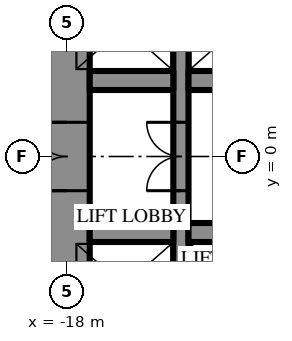
"""IFC4 building model, lengths in metres.
Left out: names, types, materials, properties, quantities, classifications, styles, units other than length and angle.
Written with IfcOpenShell. Run it as: python <this file> out.ifc"""

import sys

from ifc_helpers import new_model, si_unit, direction, frame, frame_2d, origin, place, context, subcontext, project, spatial, rectangle, extrude, element, fill, save


model = new_model("IFC4")
c1 = context("Model", 3, precision=1e-05, world=origin(), true_north=direction((0.0, 1.0)))
c2 = subcontext(c1, "Body", "Model", "MODEL_VIEW")
j1 = project(units=[si_unit("LENGTHUNIT", "METRE"), si_unit("PLANEANGLEUNIT", "RADIAN")], contexts=[c1])
p1 = place(None, origin())
s1 = spatial("IfcSite", under=j1, at=p1, CompositionType="ELEMENT")
p2 = place(p1, origin())
s2 = spatial("IfcBuilding", under=s1, at=p2, CompositionType="ELEMENT")
p3 = place(p2, frame((0.0, 0.0, 65.5)))
s3 = spatial("IfcBuildingStorey", under=s2, at=p3, CompositionType="ELEMENT", Elevation=65.5)
p4 = place(p3, frame((-18.0, 10.7, 0.0), z_axis=(0.0, 0.0, 1.0), x_axis=(0.0, -1.0, 0.0)))
e1 = element("IfcWall", 1, at=p4, inside=s3, PredefinedType="SHEAR", context=c2, shape_type="SweptSolid", body=[
    extrude(rectangle(XDim=21.4, YDim=1.2, at=frame_2d((10.7, 0.0))), origin(), (0.0, 0.0, 1.0), 4.2),
])
p5 = place(p4, frame((9.8, 0.0, 0.0)))
e2 = element("IfcOpeningElement", 2, at=p5, cuts=e1, PredefinedType="OPENING", context=c2, shape_type="SweptSolid", body=[
    extrude(rectangle(XDim=1.8, YDim=2.4, at=frame_2d((0.9, 1.2))), frame((0.0, 0.61, 0.0), z_axis=(0.0, -1.0, 0.0), x_axis=(1.0, 0.0, 0.0)), (0.0, 0.0, 1.0), 1.22),
])
p6 = place(p3, frame((-15.0, -10.7, 0.0), z_axis=(0.0, 0.0, 1.0), x_axis=(0.0, 1.0, 0.0)))
e3 = element("IfcWall", 3, at=p6, inside=s3, PredefinedType="SHEAR", context=c2, shape_type="SweptSolid", body=[
    extrude(rectangle(XDim=21.4, YDim=0.4, at=frame_2d((10.7, 0.0))), origin(), (0.0, 0.0, 1.0), 4.2),
])
p7 = place(p6, frame((9.8, 0.0, 0.0)))
e4 = element("IfcOpeningElement", 4, at=p7, cuts=e3, PredefinedType="OPENING", context=c2, shape_type="SweptSolid", body=[
    extrude(rectangle(XDim=1.8, YDim=2.4, at=frame_2d((0.9, 1.2))), frame((0.0, 0.21, 0.0), z_axis=(0.0, -1.0, 0.0), x_axis=(1.0, 0.0, 0.0)), (0.0, 0.0, 1.0), 0.42),
])
p8 = place(p3, frame((-17.4, 2.0, 0.0), z_axis=(0.0, 0.0, 1.0), x_axis=(1.0, 0.0, 0.0)))
e5 = element("IfcWall", 5, at=p8, inside=s3, PredefinedType="SHEAR", context=c2, shape_type="SweptSolid", body=[
    extrude(rectangle(XDim=2.2, YDim=0.5, at=frame_2d((1.1, 0.0))), origin(), (0.0, 0.0, 1.0), 4.2),
])
for number, where, z_axis, x_axis in (
    (6, (-14.8, 2.0, 0.0), (0.0, 0.0, 1.0), (1.0, 0.0, 0.0)),
    (7, (-12.3, -2.0, 0.0), (0.0, 0.0, 1.0), (-1.0, 0.0, 0.0)),
):
    element("IfcWall", number, at=place(p3, frame(where, z_axis=z_axis, x_axis=x_axis)), inside=s3, PredefinedType="SHEAR", context=c2, shape_type="SweptSolid", body=[
        extrude(rectangle(XDim=2.5, YDim=0.5, at=frame_2d((1.25, 0.0))), origin(), (0.0, 0.0, 1.0), 4.2),
    ])
p9 = place(p3, frame((-15.2, -2.0, 0.0), z_axis=(0.0, 0.0, 1.0), x_axis=(-1.0, 0.0, 0.0)))
e8 = element("IfcWall", 8, at=p9, inside=s3, PredefinedType="SHEAR", context=c2, shape_type="SweptSolid", body=[
    extrude(rectangle(XDim=2.2, YDim=0.5, at=frame_2d((1.1, 0.0))), origin(), (0.0, 0.0, 1.0), 4.2),
])
p10 = place(p5, frame((1.8, 0.0, 0.0), z_axis=(0.0, 0.0, 1.0), x_axis=(-1.0, 0.0, 0.0)))
e9 = element("IfcDoor", 9, at=p10, inside=s3, OperationType="DOUBLE_DOOR_SINGLE_SWING", PredefinedType="DOOR", context=c2, shape_type="SweptSolid", body=[
    extrude(rectangle(XDim=1.8, YDim=2.4, at=frame_2d((0.9, 1.2))), frame((0.0, 0.025, 0.0), z_axis=(0.0, -1.0, 0.0), x_axis=(1.0, 0.0, 0.0)), (0.0, 0.0, 1.0), 0.05),
])
fill(e2, e9)
p11 = place(p7, origin())
e10 = element("IfcDoor", 10, at=p11, inside=s3, OperationType="DOUBLE_DOOR_SINGLE_SWING", PredefinedType="DOOR", context=c2, shape_type="SweptSolid", body=[
    extrude(rectangle(XDim=1.8, YDim=2.4, at=frame_2d((0.9, 1.2))), frame((0.0, 0.025, 0.0), z_axis=(0.0, -1.0, 0.0), x_axis=(1.0, 0.0, 0.0)), (0.0, 0.0, 1.0), 0.05),
])
fill(e4, e10)
save(model, sys.argv[1])
